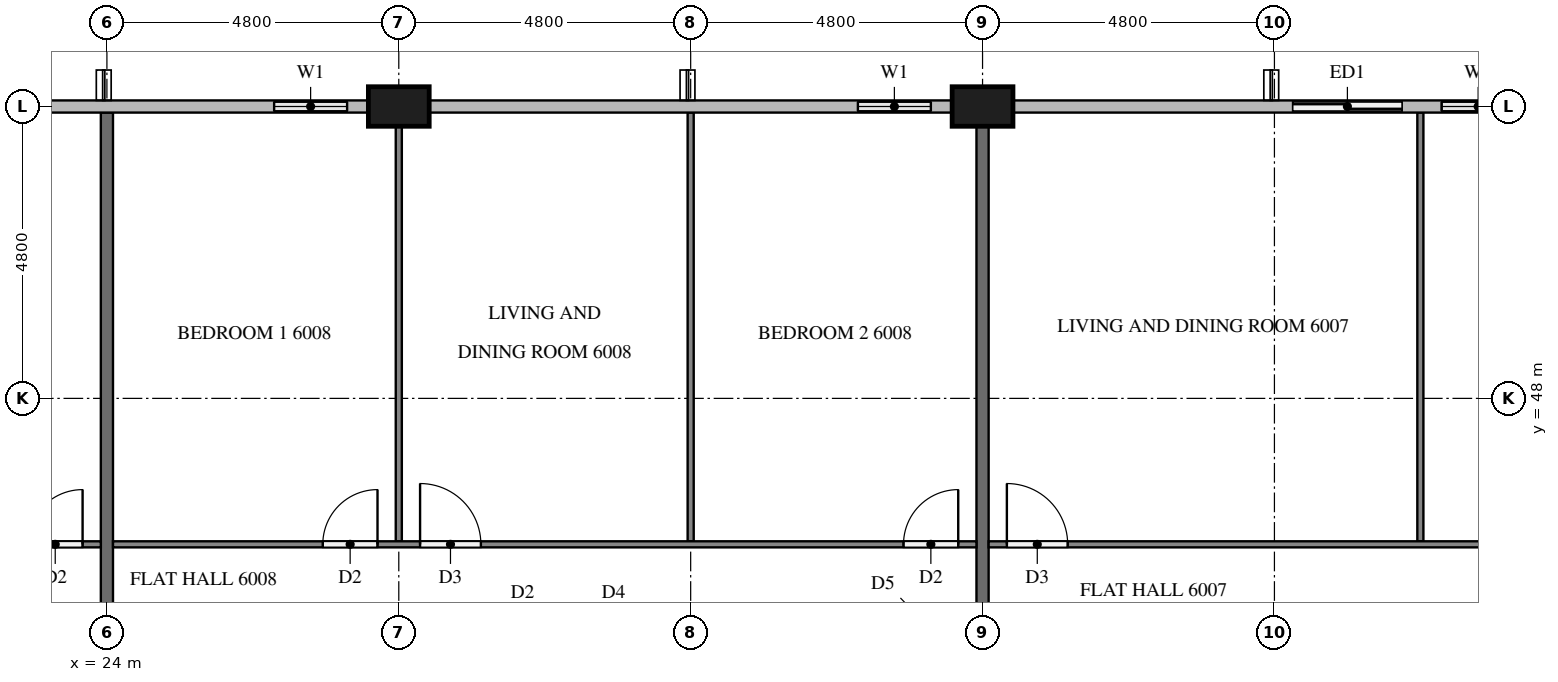
"""IFC4 building model, lengths in metres.
Left out: names, types, materials, properties, quantities, classifications, styles, units other than length and angle.
Written with IfcOpenShell. Run it as: python <this file> out.ifc"""

import sys

from ifc_helpers import new_model, si_unit, direction, frame, frame_2d, origin, origin_2d, place, context, subcontext, project, spatial, rectangle, extrude, element, fill, save


model = new_model("IFC4")
c1 = context("Model", 3, precision=1e-05, world=origin(), true_north=direction((0.0, 1.0)))
c2 = subcontext(c1, "Body", "Model", "MODEL_VIEW")
j1 = project(units=[si_unit("LENGTHUNIT", "METRE"), si_unit("PLANEANGLEUNIT", "RADIAN")], contexts=[c1])
p1 = place(None, origin())
s1 = spatial("IfcSite", under=j1, at=p1, CompositionType="ELEMENT")
p2 = place(p1, origin())
s2 = spatial("IfcBuilding", under=s1, at=p2, CompositionType="ELEMENT")
p3 = place(p2, frame((0.0, 0.0, 229.8)))
s3 = spatial("IfcBuildingStorey", under=s2, at=p3, CompositionType="ELEMENT", Elevation=229.8)
for number, where, z_axis, x_axis in (
    (1, (38.4, 52.8, 0.0), (0.0, 0.0, 1.0), (1.0, 0.0, 0.0)),
    (2, (28.8, 52.8, 0.0), (0.0, 0.0, 1.0), (1.0, 0.0, 0.0)),
):
    element("IfcColumn", number, at=place(p3, frame(where, z_axis=z_axis, x_axis=x_axis)), inside=s3, PredefinedType="COLUMN", context=c2, shape_type="SweptSolid", body=[
        extrude(rectangle(XDim=1.0, YDim=0.65, at=origin_2d()), origin(), (0.0, 0.0, 1.0), 3.1),
    ])
p4 = place(p3, frame((47.5, 52.8, 0.0), z_axis=(0.0, 0.0, 1.0), x_axis=(-1.0, 0.0, 0.0)))
e3 = element("IfcWall", 3, at=p4, inside=s3, PredefinedType="SOLIDWALL", context=c2, shape_type="SweptSolid", body=[
    extrude(rectangle(XDim=4.3, YDim=0.15, at=frame_2d((2.15, 0.0))), origin(), (0.0, 0.0, 1.0), 3.1),
])
p5 = place(p4, frame((0.35, 0.0, 0.9)))
e4 = element("IfcOpeningElement", 4, at=p5, cuts=e3, PredefinedType="OPENING", context=c2, shape_type="SweptSolid", body=[
    extrude(rectangle(XDim=1.2, YDim=1.4, at=frame_2d((0.6, 0.7))), frame((0.0, 0.085, 0.0), z_axis=(0.0, -1.0, 0.0), x_axis=(1.0, 0.0, 0.0)), (0.0, 0.0, 1.0), 0.17),
])
p6 = place(p4, frame((2.2, 0.0, 0.0)))
e5 = element("IfcOpeningElement", 5, at=p6, cuts=e3, PredefinedType="OPENING", context=c2, shape_type="SweptSolid", body=[
    extrude(rectangle(XDim=1.8, YDim=2.4, at=frame_2d((0.9, 1.2))), frame((0.0, 0.085, 0.0), z_axis=(0.0, -1.0, 0.0), x_axis=(1.0, 0.0, 0.0)), (0.0, 0.0, 1.0), 0.17),
])
p7 = place(p3, frame((37.9, 52.8, 0.0), z_axis=(0.0, 0.0, 1.0), x_axis=(-1.0, 0.0, 0.0)))
e6 = element("IfcWall", 6, at=p7, inside=s3, PredefinedType="SOLIDWALL", context=c2, shape_type="SweptSolid", body=[
    extrude(rectangle(XDim=1.9, YDim=0.15, at=frame_2d((0.95, 0.0))), origin(), (0.0, 0.0, 1.0), 3.1),
])
p8 = place(p7, frame((0.35, 0.0, 0.9)))
e7 = element("IfcOpeningElement", 7, at=p8, cuts=e6, PredefinedType="OPENING", context=c2, shape_type="SweptSolid", body=[
    extrude(rectangle(XDim=1.2, YDim=1.4, at=frame_2d((0.6, 0.7))), frame((0.0, 0.085, 0.0), z_axis=(0.0, -1.0, 0.0), x_axis=(1.0, 0.0, 0.0)), (0.0, 0.0, 1.0), 0.17),
])
p9 = place(p3, frame((28.3, 52.8, 0.0), z_axis=(0.0, 0.0, 1.0), x_axis=(-1.0, 0.0, 0.0)))
e8 = element("IfcWall", 8, at=p9, inside=s3, PredefinedType="SOLIDWALL", context=c2, shape_type="SweptSolid", body=[
    extrude(rectangle(XDim=1.9, YDim=0.15, at=frame_2d((0.95, 0.0))), origin(), (0.0, 0.0, 1.0), 3.1),
])
p10 = place(p9, frame((0.35, 0.0, 0.9)))
e9 = element("IfcOpeningElement", 9, at=p10, cuts=e8, PredefinedType="OPENING", context=c2, shape_type="SweptSolid", body=[
    extrude(rectangle(XDim=1.2, YDim=1.4, at=frame_2d((0.6, 0.7))), frame((0.0, 0.085, 0.0), z_axis=(0.0, -1.0, 0.0), x_axis=(1.0, 0.0, 0.0)), (0.0, 0.0, 1.0), 0.17),
])
p11 = place(p3, frame((38.4, 52.475, 0.0), z_axis=(0.0, 0.0, 1.0), x_axis=(0.0, -1.0, 0.0)))
e10 = element("IfcWall", 10, at=p11, inside=s3, PredefinedType="PARTITIONING", context=c2, shape_type="SweptSolid", body=[
    extrude(rectangle(XDim=11.575, YDim=0.2, at=frame_2d((5.788, 0.0))), origin(), (0.0, 0.0, 1.0), 3.1),
])
p12 = place(p3, frame((24.0, 52.7, 0.0), z_axis=(0.0, 0.0, 1.0), x_axis=(0.0, -1.0, 0.0)))
e11 = element("IfcWall", 11, at=p12, inside=s3, PredefinedType="PARTITIONING", context=c2, shape_type="SweptSolid", body=[
    extrude(rectangle(XDim=11.8, YDim=0.2, at=frame_2d((5.9, 0.0))), origin(), (0.0, 0.0, 1.0), 3.1),
])
p13 = place(p3, frame((45.6, 45.65, 0.0), z_axis=(0.0, 0.0, 1.0), x_axis=(0.0, 1.0, 0.0)))
e12 = element("IfcWall", 12, at=p13, inside=s3, PredefinedType="PARTITIONING", context=c2, shape_type="SweptSolid", body=[
    extrude(rectangle(XDim=7.05, YDim=0.1, at=frame_2d((3.525, 0.0))), origin(), (0.0, 0.0, 1.0), 3.1),
])
p14 = place(p3, frame((38.5, 45.6, 0.0), z_axis=(0.0, 0.0, 1.0), x_axis=(1.0, 0.0, 0.0)))
e13 = element("IfcWall", 13, at=p14, inside=s3, PredefinedType="PARTITIONING", context=c2, shape_type="SweptSolid", body=[
    extrude(rectangle(XDim=11.8, YDim=0.1, at=frame_2d((5.9, 0.0))), origin(), (0.0, 0.0, 1.0), 3.1),
])
p15 = place(p14, frame((10.6, 0.0, 0.0)))
e14 = element("IfcOpeningElement", 14, at=p15, cuts=e13, PredefinedType="OPENING", context=c2, shape_type="SweptSolid", body=[
    extrude(rectangle(XDim=0.9, YDim=2.1, at=frame_2d((0.45, 1.05))), frame((0.0, 0.06, 0.0), z_axis=(0.0, -1.0, 0.0), x_axis=(1.0, 0.0, 0.0)), (0.0, 0.0, 1.0), 0.12),
])
p16 = place(p14, frame((0.3, 0.0, 0.0)))
e15 = element("IfcOpeningElement", 15, at=p16, cuts=e13, PredefinedType="OPENING", context=c2, shape_type="SweptSolid", body=[
    extrude(rectangle(XDim=1.0, YDim=2.1, at=frame_2d((0.5, 1.05))), frame((0.0, 0.06, 0.0), z_axis=(0.0, -1.0, 0.0), x_axis=(1.0, 0.0, 0.0)), (0.0, 0.0, 1.0), 0.12),
])
p17 = place(p3, frame((28.8, 45.65, 0.0), z_axis=(0.0, 0.0, 1.0), x_axis=(0.0, 1.0, 0.0)))
e16 = element("IfcWall", 16, at=p17, inside=s3, PredefinedType="PARTITIONING", context=c2, shape_type="SweptSolid", body=[
    extrude(rectangle(XDim=6.825, YDim=0.1, at=frame_2d((3.413, 0.0))), origin(), (0.0, 0.0, 1.0), 3.1),
])
p18 = place(p3, frame((33.6, 45.65, 0.0), z_axis=(0.0, 0.0, 1.0), x_axis=(0.0, 1.0, 0.0)))
e17 = element("IfcWall", 17, at=p18, inside=s3, PredefinedType="PARTITIONING", context=c2, shape_type="SweptSolid", body=[
    extrude(rectangle(XDim=7.05, YDim=0.1, at=frame_2d((3.525, 0.0))), origin(), (0.0, 0.0, 1.0), 3.1),
])
p19 = place(p3, frame((24.1, 45.6, 0.0), z_axis=(0.0, 0.0, 1.0), x_axis=(1.0, 0.0, 0.0)))
e18 = element("IfcWall", 18, at=p19, inside=s3, PredefinedType="PARTITIONING", context=c2, shape_type="SweptSolid", body=[
    extrude(rectangle(XDim=14.2, YDim=0.1, at=frame_2d((7.1, 0.0))), origin(), (0.0, 0.0, 1.0), 3.1),
])
p20 = place(p19, frame((3.45, 0.0, 0.0)))
e19 = element("IfcOpeningElement", 19, at=p20, cuts=e18, PredefinedType="OPENING", context=c2, shape_type="SweptSolid", body=[
    extrude(rectangle(XDim=0.9, YDim=2.1, at=frame_2d((0.45, 1.05))), frame((0.0, 0.06, 0.0), z_axis=(0.0, -1.0, 0.0), x_axis=(1.0, 0.0, 0.0)), (0.0, 0.0, 1.0), 0.12),
])
p21 = place(p19, frame((5.05, 0.0, 0.0)))
e20 = element("IfcOpeningElement", 20, at=p21, cuts=e18, PredefinedType="OPENING", context=c2, shape_type="SweptSolid", body=[
    extrude(rectangle(XDim=1.0, YDim=2.1, at=frame_2d((0.5, 1.05))), frame((0.0, 0.06, 0.0), z_axis=(0.0, -1.0, 0.0), x_axis=(1.0, 0.0, 0.0)), (0.0, 0.0, 1.0), 0.12),
])
p22 = place(p19, frame((13.0, 0.0, 0.0)))
e21 = element("IfcOpeningElement", 21, at=p22, cuts=e18, PredefinedType="OPENING", context=c2, shape_type="SweptSolid", body=[
    extrude(rectangle(XDim=0.9, YDim=2.1, at=frame_2d((0.45, 1.05))), frame((0.0, 0.06, 0.0), z_axis=(0.0, -1.0, 0.0), x_axis=(1.0, 0.0, 0.0)), (0.0, 0.0, 1.0), 0.12),
])
p23 = place(p3, frame((4.9, 45.6, 0.0), z_axis=(0.0, 0.0, 1.0), x_axis=(1.0, 0.0, 0.0)))
e22 = element("IfcWall", 22, at=p23, inside=s3, PredefinedType="PARTITIONING", context=c2, shape_type="SweptSolid", body=[
    extrude(rectangle(XDim=19.0, YDim=0.1, at=frame_2d((9.5, 0.0))), origin(), (0.0, 0.0, 1.0), 3.1),
])
p24 = place(p23, frame((17.8, 0.0, 0.0)))
e23 = element("IfcOpeningElement", 23, at=p24, cuts=e22, PredefinedType="OPENING", context=c2, shape_type="SweptSolid", body=[
    extrude(rectangle(XDim=0.9, YDim=2.1, at=frame_2d((0.45, 1.05))), frame((0.0, 0.06, 0.0), z_axis=(0.0, -1.0, 0.0), x_axis=(1.0, 0.0, 0.0)), (0.0, 0.0, 1.0), 0.12),
])
p25 = place(p23, frame((9.85, 0.0, 0.0)))
e24 = element("IfcOpeningElement", 24, at=p25, cuts=e22, PredefinedType="OPENING", context=c2, shape_type="SweptSolid", body=[
    extrude(rectangle(XDim=0.9, YDim=2.1, at=frame_2d((0.45, 1.05))), frame((0.0, 0.06, 0.0), z_axis=(0.0, -1.0, 0.0), x_axis=(1.0, 0.0, 0.0)), (0.0, 0.0, 1.0), 0.12),
])
p26 = place(p23, frame((8.15, 0.0, 0.0)))
e25 = element("IfcOpeningElement", 25, at=p26, cuts=e22, PredefinedType="OPENING", context=c2, shape_type="SweptSolid", body=[
    extrude(rectangle(XDim=1.0, YDim=2.1, at=frame_2d((0.5, 1.05))), frame((0.0, 0.06, 0.0), z_axis=(0.0, -1.0, 0.0), x_axis=(1.0, 0.0, 0.0)), (0.0, 0.0, 1.0), 0.12),
])
p27 = place(p23, frame((0.3, 0.0, 0.0)))
e26 = element("IfcOpeningElement", 26, at=p27, cuts=e22, PredefinedType="OPENING", context=c2, shape_type="SweptSolid", body=[
    extrude(rectangle(XDim=0.9, YDim=2.1, at=frame_2d((0.45, 1.05))), frame((0.0, 0.06, 0.0), z_axis=(0.0, -1.0, 0.0), x_axis=(1.0, 0.0, 0.0)), (0.0, 0.0, 1.0), 0.12),
])
p28 = place(p5, origin())
e27 = element("IfcWindow", 27, at=p28, inside=s3, PartitioningType="SINGLE_PANEL", PredefinedType="WINDOW", context=c2, shape_type="SweptSolid", body=[
    extrude(rectangle(XDim=1.2, YDim=1.4, at=frame_2d((0.6, 0.7))), frame((0.0, 0.03, 0.0), z_axis=(0.0, -1.0, 0.0), x_axis=(1.0, 0.0, 0.0)), (0.0, 0.0, 1.0), 0.06),
])
fill(e4, e27)
p29 = place(p6, origin())
e28 = element("IfcDoor", 28, at=p29, inside=s3, OperationType="SLIDING_TO_LEFT", PredefinedType="DOOR", context=c2, shape_type="SweptSolid", body=[
    extrude(rectangle(XDim=1.8, YDim=2.4, at=frame_2d((0.9, 1.2))), frame((0.0, 0.025, 0.0), z_axis=(0.0, -1.0, 0.0), x_axis=(1.0, 0.0, 0.0)), (0.0, 0.0, 1.0), 0.05),
])
fill(e5, e28)
p30 = place(p8, origin())
e29 = element("IfcWindow", 29, at=p30, inside=s3, PartitioningType="SINGLE_PANEL", PredefinedType="WINDOW", context=c2, shape_type="SweptSolid", body=[
    extrude(rectangle(XDim=1.2, YDim=1.4, at=frame_2d((0.6, 0.7))), frame((0.0, 0.03, 0.0), z_axis=(0.0, -1.0, 0.0), x_axis=(1.0, 0.0, 0.0)), (0.0, 0.0, 1.0), 0.06),
])
fill(e7, e29)
p31 = place(p10, origin())
e30 = element("IfcWindow", 30, at=p31, inside=s3, PartitioningType="SINGLE_PANEL", PredefinedType="WINDOW", context=c2, shape_type="SweptSolid", body=[
    extrude(rectangle(XDim=1.2, YDim=1.4, at=frame_2d((0.6, 0.7))), frame((0.0, 0.03, 0.0), z_axis=(0.0, -1.0, 0.0), x_axis=(1.0, 0.0, 0.0)), (0.0, 0.0, 1.0), 0.06),
])
fill(e9, e30)
p32 = place(p16, origin())
e31 = element("IfcDoor", 31, at=p32, inside=s3, OperationType="SINGLE_SWING_LEFT", PredefinedType="DOOR", context=c2, shape_type="SweptSolid", body=[
    extrude(rectangle(XDim=1.0, YDim=2.1, at=frame_2d((0.5, 1.05))), frame((0.0, 0.025, 0.0), z_axis=(0.0, -1.0, 0.0), x_axis=(1.0, 0.0, 0.0)), (0.0, 0.0, 1.0), 0.05),
])
fill(e15, e31)
p33 = place(p20, origin())
e32 = element("IfcDoor", 32, at=p33, inside=s3, OperationType="SINGLE_SWING_RIGHT", PredefinedType="DOOR", context=c2, shape_type="SweptSolid", body=[
    extrude(rectangle(XDim=0.9, YDim=2.1, at=frame_2d((0.45, 1.05))), frame((0.0, 0.025, 0.0), z_axis=(0.0, -1.0, 0.0), x_axis=(1.0, 0.0, 0.0)), (0.0, 0.0, 1.0), 0.05),
])
fill(e19, e32)
p34 = place(p21, origin())
e33 = element("IfcDoor", 33, at=p34, inside=s3, OperationType="SINGLE_SWING_LEFT", PredefinedType="DOOR", context=c2, shape_type="SweptSolid", body=[
    extrude(rectangle(XDim=1.0, YDim=2.1, at=frame_2d((0.5, 1.05))), frame((0.0, 0.025, 0.0), z_axis=(0.0, -1.0, 0.0), x_axis=(1.0, 0.0, 0.0)), (0.0, 0.0, 1.0), 0.05),
])
fill(e20, e33)
p35 = place(p22, origin())
e34 = element("IfcDoor", 34, at=p35, inside=s3, OperationType="SINGLE_SWING_RIGHT", PredefinedType="DOOR", context=c2, shape_type="SweptSolid", body=[
    extrude(rectangle(XDim=0.9, YDim=2.1, at=frame_2d((0.45, 1.05))), frame((0.0, 0.025, 0.0), z_axis=(0.0, -1.0, 0.0), x_axis=(1.0, 0.0, 0.0)), (0.0, 0.0, 1.0), 0.05),
])
fill(e21, e34)
p36 = place(p24, origin())
e35 = element("IfcDoor", 35, at=p36, inside=s3, OperationType="SINGLE_SWING_RIGHT", PredefinedType="DOOR", context=c2, shape_type="SweptSolid", body=[
    extrude(rectangle(XDim=0.9, YDim=2.1, at=frame_2d((0.45, 1.05))), frame((0.0, 0.025, 0.0), z_axis=(0.0, -1.0, 0.0), x_axis=(1.0, 0.0, 0.0)), (0.0, 0.0, 1.0), 0.05),
])
fill(e23, e35)
save(model, sys.argv[1])
